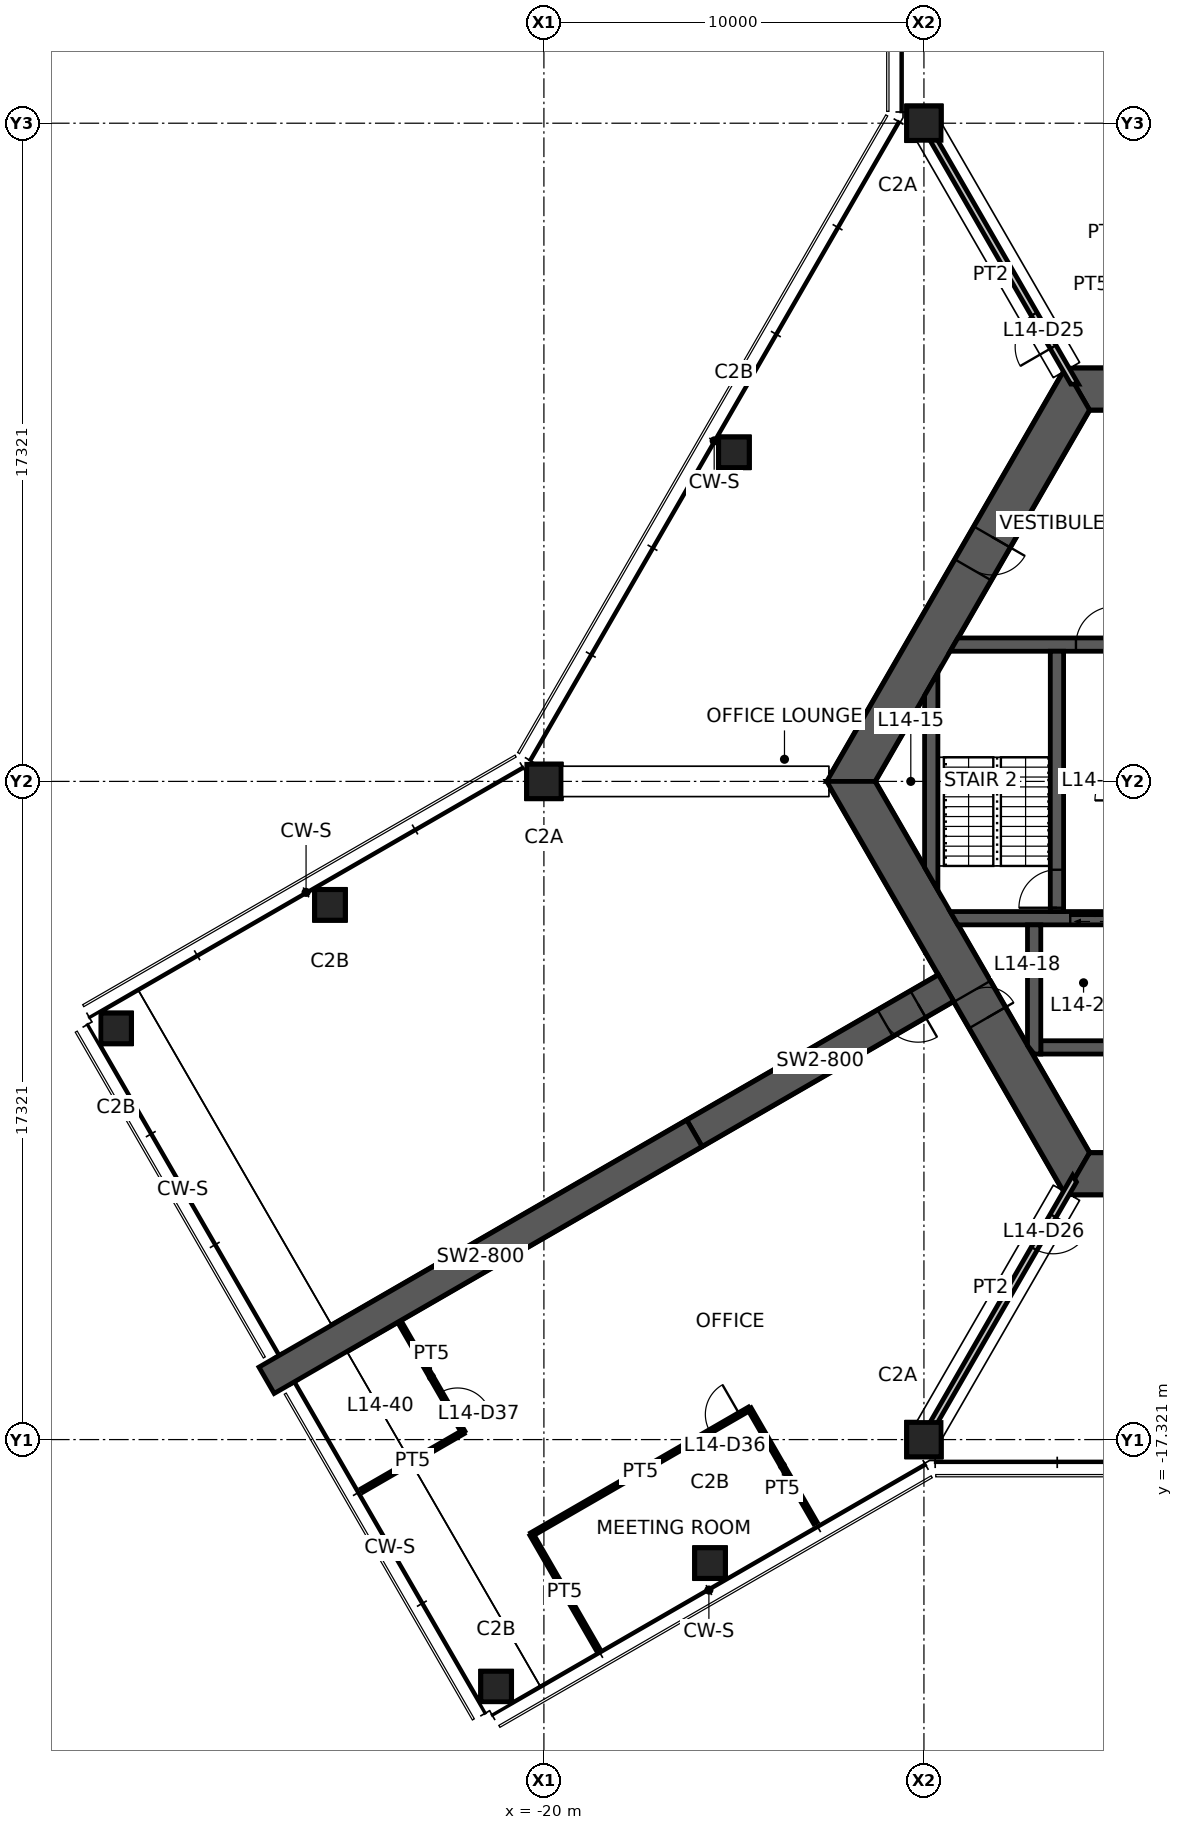
"""IFC4 building model, lengths in metres.
Left out: names, types, materials, properties, quantities, classifications, styles, units other than length and angle.
Written with IfcOpenShell. Run it as: python <this file> out.ifc"""

import sys

from ifc_helpers import new_model, si_unit, direction, frame, frame_2d, origin, origin_2d, place, context, subcontext, project, spatial, polyline, rectangle, hollow_rectangle, outline, extrude, element, fill, save


model = new_model("IFC4")
c1 = context("Model", 3, precision=1e-05, world=origin(), true_north=direction((0.0, 1.0)))
c2 = subcontext(c1, "Body", "Model", "MODEL_VIEW")
j1 = project(units=[si_unit("LENGTHUNIT", "METRE"), si_unit("PLANEANGLEUNIT", "RADIAN")], contexts=[c1])
p1 = place(None, origin())
s1 = spatial("IfcSite", under=j1, at=p1, CompositionType="ELEMENT")
p2 = place(p1, origin())
s2 = spatial("IfcBuilding", under=s1, at=p2, CompositionType="ELEMENT")
p3 = place(p2, frame((0.0, 0.0, 57.0)))
s3 = spatial("IfcBuildingStorey", under=s2, at=p3, CompositionType="ELEMENT", Elevation=57.0)
for number, where, z_axis, x_axis in (
    (1, (-10.0, 17.321, 0.0), (0.0, 0.0, 1.0), (1.0, 0.0, 0.0)),
    (2, (-20.0, 0.0, 0.0), (0.0, 0.0, 1.0), (1.0, 0.0, 0.0)),
    (3, (-10.0, -17.321, 0.0), (0.0, 0.0, 1.0), (1.0, 0.0, 0.0)),
):
    element("IfcColumn", number, at=place(p3, frame(where, z_axis=z_axis, x_axis=x_axis)), inside=s3, PredefinedType="COLUMN", context=c2, shape_type="SweptSolid", body=[
        extrude(hollow_rectangle(XDim=0.9, YDim=0.9, WallThickness=0.055, at=origin_2d()), origin(), (0.0, 0.0, 1.0), 4.2),
    ])
for number, where, z_axis, x_axis in (
    (4, (-15.0, 8.66, 0.0), (0.0, 0.0, 1.0), (1.0, 0.0, 0.0)),
    (5, (-25.629, -3.25, 0.0), (0.0, 0.0, 1.0), (1.0, 0.0, 0.0)),
    (6, (-31.258, -6.5, 0.0), (0.0, 0.0, 1.0), (1.0, 0.0, 0.0)),
    (7, (-15.629, -20.571, 0.0), (0.0, 0.0, 1.0), (1.0, 0.0, 0.0)),
    (8, (-21.258, -23.821, 0.0), (0.0, 0.0, 1.0), (1.0, 0.0, 0.0)),
):
    element("IfcColumn", number, at=place(p3, frame(where, z_axis=z_axis, x_axis=x_axis)), inside=s3, PredefinedType="COLUMN", context=c2, shape_type="SweptSolid", body=[
        extrude(hollow_rectangle(XDim=0.8, YDim=0.8, WallThickness=0.045, at=origin_2d()), origin(), (0.0, 0.0, 1.0), 4.2),
    ])
p4 = place(p3, frame((5.961, 10.325, 0.0), z_axis=(0.0, 0.0, 1.0), x_axis=(-1.0, 0.0, 0.0)))
e9 = element("IfcWall", 9, at=p4, inside=s3, PredefinedType="SHEAR", context=c2, shape_type="SweptSolid", body=[
    extrude(outline(polyline([(-0.318, -0.55), (4.599, -0.55), (5.499, -0.55), (6.424, -0.55), (7.323, -0.55), (12.24, -0.55), (11.605, 0.55), (7.323, 0.55), (6.424, 0.55), (5.499, 0.55), (4.599, 0.55), (0.318, 0.55), (-0.318, -0.55)])), origin(), (0.0, 0.0, 1.0), 4.2),
])
p5 = place(p4, frame((6.424, 0.0, 0.0)))
e10 = element("IfcOpeningElement", 10, at=p5, cuts=e9, PredefinedType="OPENING", context=c2, shape_type="SweptSolid", body=[
    extrude(rectangle(XDim=0.9, YDim=2.1, at=frame_2d((0.45, 1.05))), frame((0.0, 0.56, 0.0), z_axis=(0.0, -1.0, 0.0), x_axis=(1.0, 0.0, 0.0)), (0.0, 0.0, 1.0), 1.12),
])
p6 = place(p4, frame((4.599, 0.0, 0.0)))
e11 = element("IfcOpeningElement", 11, at=p6, cuts=e9, PredefinedType="OPENING", context=c2, shape_type="SweptSolid", body=[
    extrude(rectangle(XDim=0.9, YDim=2.1, at=frame_2d((0.45, 1.05))), frame((0.0, 0.56, 0.0), z_axis=(0.0, -1.0, 0.0), x_axis=(1.0, 0.0, 0.0)), (0.0, 0.0, 1.0), 1.12),
])
p7 = place(p3, frame((-5.961, 10.325, 0.0), z_axis=(0.0, 0.0, 1.0), x_axis=(-0.500004296715, -0.866022923061, 0.0)))
e12 = element("IfcWall", 12, at=p7, inside=s3, PredefinedType="SHEAR", context=c2, shape_type="SweptSolid", body=[
    extrude(outline(polyline([(-0.318, -0.55), (4.494, -0.55), (5.494, -0.55), (12.24, -0.55), (11.605, 0.55), (5.494, 0.55), (4.494, 0.55), (0.318, 0.55), (-0.318, -0.55)])), origin(), (0.0, 0.0, 1.0), 4.2),
])
p8 = place(p7, frame((4.494, 0.0, 0.0)))
e13 = element("IfcOpeningElement", 13, at=p8, cuts=e12, PredefinedType="OPENING", context=c2, shape_type="SweptSolid", body=[
    extrude(rectangle(XDim=1.0, YDim=2.1, at=frame_2d((0.5, 1.05))), frame((0.0, 0.56, 0.0), z_axis=(0.0, -1.0, 0.0), x_axis=(1.0, 0.0, 0.0)), (0.0, 0.0, 1.0), 1.12),
])
p9 = place(p3, frame((-11.922, 0.0, 0.0), z_axis=(0.0, 0.0, 1.0), x_axis=(0.500004296715, -0.866022923061, 0.0)))
e14 = element("IfcWall", 14, at=p9, inside=s3, PredefinedType="SHEAR", context=c2, shape_type="SweptSolid", body=[
    extrude(outline(polyline([(-0.318, -0.55), (6.381, -0.55), (7.181, -0.55), (12.24, -0.55), (11.605, 0.55), (7.181, 0.55), (6.381, 0.55), (0.318, 0.55), (-0.318, -0.55)])), origin(), (0.0, 0.0, 1.0), 4.2),
])
p10 = place(p9, frame((6.381, 0.0, 0.0)))
e15 = element("IfcOpeningElement", 15, at=p10, cuts=e14, PredefinedType="OPENING", context=c2, shape_type="SweptSolid", body=[
    extrude(rectangle(XDim=0.8, YDim=2.1, at=frame_2d((0.4, 1.05))), frame((0.0, 0.56, 0.0), z_axis=(0.0, -1.0, 0.0), x_axis=(1.0, 0.0, 0.0)), (0.0, 0.0, 1.0), 1.12),
])
p11 = place(p3, frame((-5.961, -10.325, 0.0), z_axis=(0.0, 0.0, 1.0), x_axis=(1.0, 0.0, 0.0)))
e16 = element("IfcWall", 16, at=p11, inside=s3, PredefinedType="SHEAR", context=c2, shape_type="SweptSolid", body=[
    extrude(outline(polyline([(-0.318, -0.55), (5.461, -0.55), (6.461, -0.55), (12.24, -0.55), (11.605, 0.55), (6.461, 0.55), (5.461, 0.55), (0.318, 0.55), (-0.318, -0.55)])), origin(), (0.0, 0.0, 1.0), 4.2),
])
p12 = place(p11, frame((5.461, 0.0, 0.0)))
e17 = element("IfcOpeningElement", 17, at=p12, cuts=e16, PredefinedType="OPENING", context=c2, shape_type="SweptSolid", body=[
    extrude(rectangle(XDim=1.0, YDim=2.1, at=frame_2d((0.5, 1.05))), frame((0.0, 0.56, 0.0), z_axis=(0.0, -1.0, 0.0), x_axis=(1.0, 0.0, 0.0)), (0.0, 0.0, 1.0), 1.12),
])
p13 = place(p3, frame((-9.418, -5.438, 0.0), z_axis=(0.0, 0.0, 1.0), x_axis=(-0.866029782078, -0.499992416496, 0.0)))
e18 = element("IfcWall", 18, at=p13, inside=s3, PredefinedType="SHEAR", context=c2, shape_type="SweptSolid", body=[
    extrude(rectangle(XDim=7.646, YDim=0.8, at=frame_2d((3.823, 0.0))), origin(), (0.0, 0.0, 1.0), 4.2),
])
p14 = place(p13, frame((0.85, 0.0, 0.0)))
e19 = element("IfcOpeningElement", 19, at=p14, cuts=e18, PredefinedType="OPENING", context=c2, shape_type="SweptSolid", body=[
    extrude(rectangle(XDim=1.0, YDim=2.1, at=frame_2d((0.5, 1.05))), frame((0.0, 0.41, 0.0), z_axis=(0.0, -1.0, 0.0), x_axis=(1.0, 0.0, 0.0)), (0.0, 0.0, 1.0), 0.82),
])
p15 = place(p3, frame((-16.039, -9.26, 0.0), z_axis=(0.0, 0.0, 1.0), x_axis=(-0.866024837091, -0.50000098154, 0.0)))
e20 = element("IfcWall", 20, at=p15, inside=s3, PredefinedType="SHEAR", context=c2, shape_type="SweptSolid", body=[
    extrude(rectangle(XDim=13.0, YDim=0.8, at=frame_2d((6.5, 0.0))), origin(), (0.0, 0.0, 1.0), 4.2),
])
p16 = place(p3, frame((-9.209, 3.6, 0.0), z_axis=(0.0, 0.0, 1.0), x_axis=(1.0, 0.0, 0.0)))
e21 = element("IfcWall", 21, at=p16, inside=s3, PredefinedType="SHEAR", context=c2, shape_type="SweptSolid", body=[
    extrude(outline(polyline([(-0.101, -0.175), (3.209, -0.175), (4.209, -0.175), (5.609, -0.175), (6.709, -0.175), (7.784, -0.175), (7.784, 0.175), (6.709, 0.175), (5.609, 0.175), (4.209, 0.175), (3.209, 0.175), (0.101, 0.175), (-0.101, -0.175)])), origin(), (0.0, 0.0, 1.0), 4.2),
])
p17 = place(p16, frame((3.209, 0.0, 0.0)))
e22 = element("IfcOpeningElement", 22, at=p17, cuts=e21, PredefinedType="OPENING", context=c2, shape_type="SweptSolid", body=[
    extrude(rectangle(XDim=1.0, YDim=2.1, at=frame_2d((0.5, 1.05))), frame((0.0, 0.185, 0.0), z_axis=(0.0, -1.0, 0.0), x_axis=(1.0, 0.0, 0.0)), (0.0, 0.0, 1.0), 0.37),
])
p18 = place(p16, frame((5.609, 0.0, 0.0)))
e23 = element("IfcOpeningElement", 23, at=p18, cuts=e21, PredefinedType="OPENING", context=c2, shape_type="SweptSolid", body=[
    extrude(rectangle(XDim=1.1, YDim=2.1, at=frame_2d((0.55, 1.05))), frame((0.0, 0.185, 0.0), z_axis=(0.0, -1.0, 0.0), x_axis=(1.0, 0.0, 0.0)), (0.0, 0.0, 1.0), 0.37),
])
p19 = place(p3, frame((-9.209, -3.6, 0.0), z_axis=(0.0, 0.0, 1.0), x_axis=(1.0, 0.0, 0.0)))
e24 = element("IfcWall", 24, at=p19, inside=s3, PredefinedType="SHEAR", context=c2, shape_type="SweptSolid", body=[
    extrude(outline(polyline([(0.101, -0.175), (3.059, -0.175), (4.359, -0.175), (5.609, -0.175), (6.709, -0.175), (7.784, -0.175), (7.784, 0.175), (6.709, 0.175), (5.609, 0.175), (4.359, 0.175), (3.059, 0.175), (-0.101, 0.175), (0.101, -0.175)])), origin(), (0.0, 0.0, 1.0), 4.2),
])
p20 = place(p19, frame((5.609, 0.0, 0.0)))
e25 = element("IfcOpeningElement", 25, at=p20, cuts=e24, PredefinedType="OPENING", context=c2, shape_type="SweptSolid", body=[
    extrude(rectangle(XDim=1.1, YDim=2.1, at=frame_2d((0.55, 1.05))), frame((0.0, 0.185, 0.0), z_axis=(0.0, -1.0, 0.0), x_axis=(1.0, 0.0, 0.0)), (0.0, 0.0, 1.0), 0.37),
])
p21 = place(p19, frame((3.059, 0.0, 0.0)))
e26 = element("IfcOpeningElement", 26, at=p21, cuts=e24, PredefinedType="OPENING", context=c2, shape_type="SweptSolid", body=[
    extrude(rectangle(XDim=1.3, YDim=2.1, at=frame_2d((0.65, 1.05))), frame((0.0, 0.185, 0.0), z_axis=(0.0, -1.0, 0.0), x_axis=(1.0, 0.0, 0.0)), (0.0, 0.0, 1.0), 0.37),
])
p22 = place(p3, frame((-6.5, -3.425, 0.0), z_axis=(0.0, 0.0, 1.0), x_axis=(0.0, 1.0, 0.0)))
e27 = element("IfcWall", 27, at=p22, inside=s3, PredefinedType="SHEAR", context=c2, shape_type="SweptSolid", body=[
    extrude(rectangle(XDim=6.85, YDim=0.35, at=frame_2d((3.425, 0.0))), origin(), (0.0, 0.0, 1.0), 4.2),
])
p23 = place(p22, frame((0.1, 0.0, 0.0)))
e28 = element("IfcOpeningElement", 28, at=p23, cuts=e27, PredefinedType="OPENING", context=c2, shape_type="SweptSolid", body=[
    extrude(rectangle(XDim=1.0, YDim=2.1, at=frame_2d((0.5, 1.05))), frame((0.0, 0.185, 0.0), z_axis=(0.0, -1.0, 0.0), x_axis=(1.0, 0.0, 0.0)), (0.0, 0.0, 1.0), 0.37),
])
p24 = place(p3, frame((-6.925, -7.0, 0.0), z_axis=(0.0, 0.0, 1.0), x_axis=(1.0, 0.0, 0.0)))
e29 = element("IfcWall", 29, at=p24, inside=s3, PredefinedType="SHEAR", context=c2, shape_type="SweptSolid", body=[
    extrude(rectangle(XDim=2.25, YDim=0.35, at=frame_2d((1.125, 0.0))), origin(), (0.0, 0.0, 1.0), 4.2),
])
p25 = place(p3, frame((-7.1, -3.775, 0.0), z_axis=(0.0, 0.0, 1.0), x_axis=(0.0, -1.0, 0.0)))
e30 = element("IfcWall", 30, at=p25, inside=s3, PredefinedType="SHEAR", context=c2, shape_type="SweptSolid", body=[
    extrude(outline(polyline([(0.0, -0.175), (3.175, -0.175), (3.4, 0.0), (3.4, 0.175), (0.0, 0.175), (0.0, -0.175)])), origin(), (0.0, 0.0, 1.0), 4.2),
])
p26 = place(p3, frame((-9.808, -2.562, 0.0), z_axis=(0.0, 0.0, 1.0), x_axis=(0.0, 1.0, 0.0)))
e31 = element("IfcWall", 31, at=p26, inside=s3, PredefinedType="SHEAR", context=c2, shape_type="SweptSolid", body=[
    extrude(outline(polyline([(-0.303, -0.175), (5.428, -0.175), (4.821, 0.175), (0.303, 0.175), (-0.303, -0.175)])), origin(), (0.0, 0.0, 1.0), 4.2),
])
p27 = place(p3, frame((-6.036, 10.455, 0.0), z_axis=(0.0, 0.0, 1.0), x_axis=(-0.500007693191, 0.866020962073, 0.0)))
e32 = element("IfcWall", 32, at=p27, inside=s3, PredefinedType="PARTITIONING", context=c2, shape_type="SweptSolid", body=[
    extrude(outline(polyline([(-0.051, -0.087), (1.127, -0.087), (2.127, -0.087), (7.928, -0.087), (7.928, 0.087), (2.127, 0.087), (1.127, 0.087), (0.051, 0.087), (-0.051, -0.087)])), origin(), (0.0, 0.0, 1.0), 3.35),
])
p28 = place(p27, frame((1.127, 0.0, 0.0)))
e33 = element("IfcOpeningElement", 33, at=p28, cuts=e32, PredefinedType="OPENING", context=c2, shape_type="SweptSolid", body=[
    extrude(rectangle(XDim=1.0, YDim=2.1, at=frame_2d((0.5, 1.05))), frame((0.0, 0.098, 0.0), z_axis=(0.0, -1.0, 0.0), x_axis=(1.0, 0.0, 0.0)), (0.0, 0.0, 1.0), 0.195),
])
p29 = place(p3, frame((-6.036, -10.455, 0.0), z_axis=(0.0, 0.0, 1.0), x_axis=(-0.500007693191, -0.866020962073, 0.0)))
e34 = element("IfcWall", 34, at=p29, inside=s3, PredefinedType="PARTITIONING", context=c2, shape_type="SweptSolid", body=[
    extrude(outline(polyline([(-0.051, -0.087), (1.127, -0.087), (2.127, -0.087), (7.928, -0.087), (7.928, 0.087), (2.127, 0.087), (1.127, 0.087), (0.051, 0.087), (-0.051, -0.087)])), origin(), (0.0, 0.0, 1.0), 3.35),
])
p30 = place(p29, frame((1.127, 0.0, 0.0)))
e35 = element("IfcOpeningElement", 35, at=p30, cuts=e34, PredefinedType="OPENING", context=c2, shape_type="SweptSolid", body=[
    extrude(rectangle(XDim=1.0, YDim=2.1, at=frame_2d((0.5, 1.05))), frame((0.0, 0.098, 0.0), z_axis=(0.0, -1.0, 0.0), x_axis=(1.0, 0.0, 0.0)), (0.0, 0.0, 1.0), 0.195),
])
p31 = place(p3, frame((-20.325, -19.817, 0.0), z_axis=(0.0, 0.0, 1.0), x_axis=(0.866037567856, 0.499978930619, 0.0)))
e36 = element("IfcWall", 36, at=p31, inside=s3, PredefinedType="PARTITIONING", context=c2, shape_type="SweptSolid", body=[
    extrude(rectangle(XDim=6.619, YDim=0.1, at=frame_2d((3.31, 0.0))), origin(), (0.0, 0.0, 1.0), 3.25),
])
p32 = place(p31, frame((5.42, 0.0, 0.0)))
e37 = element("IfcOpeningElement", 37, at=p32, cuts=e36, PredefinedType="OPENING", context=c2, shape_type="SweptSolid", body=[
    extrude(rectangle(XDim=0.9, YDim=2.1, at=frame_2d((0.45, 1.05))), frame((0.0, 0.06, 0.0), z_axis=(0.0, -1.0, 0.0), x_axis=(1.0, 0.0, 0.0)), (0.0, 0.0, 1.0), 0.12),
])
p33 = place(p3, frame((-18.585, -22.831, 0.0), z_axis=(0.0, 0.0, 1.0), x_axis=(-0.499979528911, 0.866037222451, 0.0)))
e38 = element("IfcWall", 38, at=p33, inside=s3, PredefinedType="PARTITIONING", context=c2, shape_type="SweptSolid", body=[
    extrude(rectangle(XDim=3.48, YDim=0.1, at=frame_2d((1.74, 0.0))), origin(), (0.0, 0.0, 1.0), 3.25),
])
p34 = place(p3, frame((-14.592, -16.508, 0.0), z_axis=(0.0, 0.0, 1.0), x_axis=(0.500051338648, -0.865995761373, 0.0)))
e39 = element("IfcWall", 39, at=p34, inside=s3, PredefinedType="PARTITIONING", context=c2, shape_type="SweptSolid", body=[
    extrude(rectangle(XDim=3.47, YDim=0.1, at=frame_2d((1.735, 0.0))), origin(), (0.0, 0.0, 1.0), 3.25),
])
p35 = place(p3, frame((-23.797, -14.224, 0.0), z_axis=(0.0, 0.0, 1.0), x_axis=(0.500015043844, -0.866016718043, 0.0)))
e40 = element("IfcWall", 40, at=p35, inside=s3, PredefinedType="PARTITIONING", context=c2, shape_type="SweptSolid", body=[
    extrude(rectangle(XDim=3.347, YDim=0.1, at=frame_2d((1.673, 0.0))), origin(), (0.0, 0.0, 1.0), 3.25),
])
p36 = place(p35, frame((2.147, 0.0, 0.0)))
e41 = element("IfcOpeningElement", 41, at=p36, cuts=e40, PredefinedType="OPENING", context=c2, shape_type="SweptSolid", body=[
    extrude(rectangle(XDim=0.9, YDim=2.1, at=frame_2d((0.45, 1.05))), frame((0.0, 0.06, 0.0), z_axis=(0.0, -1.0, 0.0), x_axis=(1.0, 0.0, 0.0)), (0.0, 0.0, 1.0), 0.12),
])
p37 = place(p3, frame((-22.123, -17.122, 0.0), z_axis=(0.0, 0.0, 1.0), x_axis=(-0.866037264291, -0.499979456437, 0.0)))
e42 = element("IfcWall", 42, at=p37, inside=s3, PredefinedType="PARTITIONING", context=c2, shape_type="SweptSolid", body=[
    extrude(rectangle(XDim=3.07, YDim=0.1, at=frame_2d((1.535, 0.0))), origin(), (0.0, 0.0, 1.0), 3.25),
])
p38 = place(p10, origin())
e43 = element("IfcDoor", 43, at=p38, inside=s3, OperationType="SINGLE_SWING_RIGHT", PredefinedType="DOOR", context=c2, shape_type="SweptSolid", body=[
    extrude(rectangle(XDim=0.8, YDim=2.1, at=frame_2d((0.4, 1.05))), frame((0.0, 0.025, 0.0), z_axis=(0.0, -1.0, 0.0), x_axis=(1.0, 0.0, 0.0)), (0.0, 0.0, 1.0), 0.05),
])
fill(e15, e43)
p39 = place(p8, origin())
e44 = element("IfcDoor", 44, at=p39, inside=s3, OperationType="SINGLE_SWING_LEFT", PredefinedType="DOOR", context=c2, shape_type="SweptSolid", body=[
    extrude(rectangle(XDim=1.0, YDim=2.1, at=frame_2d((0.5, 1.05))), frame((0.0, 0.025, 0.0), z_axis=(0.0, -1.0, 0.0), x_axis=(1.0, 0.0, 0.0)), (0.0, 0.0, 1.0), 0.05),
])
fill(e13, e44)
p40 = place(p23, origin())
e45 = element("IfcDoor", 45, at=p40, inside=s3, OperationType="SINGLE_SWING_LEFT", PredefinedType="DOOR", context=c2, shape_type="SweptSolid", body=[
    extrude(rectangle(XDim=1.0, YDim=2.1, at=frame_2d((0.5, 1.05))), frame((0.0, 0.025, 0.0), z_axis=(0.0, -1.0, 0.0), x_axis=(1.0, 0.0, 0.0)), (0.0, 0.0, 1.0), 0.05),
])
fill(e28, e45)
p41 = place(p17, origin())
e46 = element("IfcDoor", 46, at=p41, inside=s3, OperationType="SINGLE_SWING_RIGHT", PredefinedType="DOOR", context=c2, shape_type="SweptSolid", body=[
    extrude(rectangle(XDim=1.0, YDim=2.1, at=frame_2d((0.5, 1.05))), frame((0.0, 0.025, 0.0), z_axis=(0.0, -1.0, 0.0), x_axis=(1.0, 0.0, 0.0)), (0.0, 0.0, 1.0), 0.05),
])
fill(e22, e46)
p42 = place(p14, origin())
e47 = element("IfcDoor", 47, at=p42, inside=s3, OperationType="SINGLE_SWING_LEFT", PredefinedType="DOOR", context=c2, shape_type="SweptSolid", body=[
    extrude(rectangle(XDim=1.0, YDim=2.1, at=frame_2d((0.5, 1.05))), frame((0.0, 0.025, 0.0), z_axis=(0.0, -1.0, 0.0), x_axis=(1.0, 0.0, 0.0)), (0.0, 0.0, 1.0), 0.05),
])
fill(e19, e47)
p43 = place(p28, origin())
e48 = element("IfcDoor", 48, at=p43, inside=s3, OperationType="SINGLE_SWING_LEFT", PredefinedType="DOOR", context=c2, shape_type="SweptSolid", body=[
    extrude(rectangle(XDim=1.0, YDim=2.1, at=frame_2d((0.5, 1.05))), frame((0.0, 0.025, 0.0), z_axis=(0.0, -1.0, 0.0), x_axis=(1.0, 0.0, 0.0)), (0.0, 0.0, 1.0), 0.05),
])
fill(e33, e48)
p44 = place(p30, origin())
e49 = element("IfcDoor", 49, at=p44, inside=s3, OperationType="SINGLE_SWING_LEFT", PredefinedType="DOOR", context=c2, shape_type="SweptSolid", body=[
    extrude(rectangle(XDim=1.0, YDim=2.1, at=frame_2d((0.5, 1.05))), frame((0.0, 0.025, 0.0), z_axis=(0.0, -1.0, 0.0), x_axis=(1.0, 0.0, 0.0)), (0.0, 0.0, 1.0), 0.05),
])
fill(e35, e49)
p45 = place(p32, origin())
e50 = element("IfcDoor", 50, at=p45, inside=s3, OperationType="SINGLE_SWING_RIGHT", PredefinedType="DOOR", context=c2, shape_type="SweptSolid", body=[
    extrude(rectangle(XDim=0.9, YDim=2.1, at=frame_2d((0.45, 1.05))), frame((0.0, 0.025, 0.0), z_axis=(0.0, -1.0, 0.0), x_axis=(1.0, 0.0, 0.0)), (0.0, 0.0, 1.0), 0.05),
])
fill(e37, e50)
p46 = place(p36, origin())
e51 = element("IfcDoor", 51, at=p46, inside=s3, OperationType="SINGLE_SWING_RIGHT", PredefinedType="DOOR", context=c2, shape_type="SweptSolid", body=[
    extrude(rectangle(XDim=0.9, YDim=2.1, at=frame_2d((0.45, 1.05))), frame((0.0, 0.025, 0.0), z_axis=(0.0, -1.0, 0.0), x_axis=(1.0, 0.0, 0.0)), (0.0, 0.0, 1.0), 0.05),
])
fill(e41, e51)
p47 = place(p21, origin())
e52 = element("IfcDoor", 52, at=p47, inside=s3, OperationType="DOUBLE_DOOR_SLIDING", PredefinedType="DOOR", context=c2, shape_type="SweptSolid", body=[
    extrude(rectangle(XDim=1.3, YDim=2.1, at=frame_2d((0.65, 1.05))), frame((0.0, 0.025, 0.0), z_axis=(0.0, -1.0, 0.0), x_axis=(1.0, 0.0, 0.0)), (0.0, 0.0, 1.0), 0.05),
])
fill(e26, e52)
save(model, sys.argv[1])
